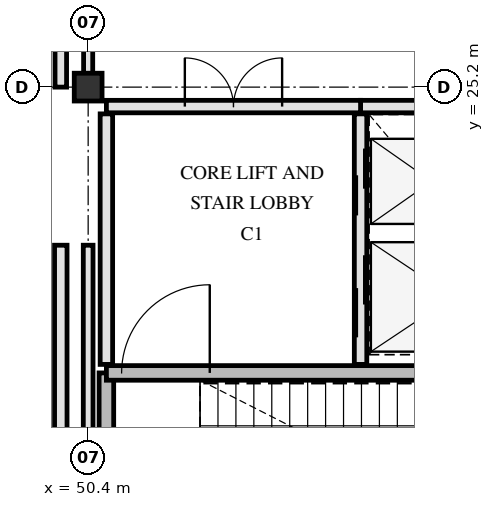
"""IFC4 building model, lengths in metres.
Left out: names, types, materials, properties, quantities, classifications, styles, units other than length and angle.
Written with IfcOpenShell. Run it as: python <this file> out.ifc"""

import sys

from ifc_helpers import new_model, si_unit, direction, frame, frame_2d, origin, origin_2d, place, context, subcontext, project, spatial, rectangle, hollow_circle, extrude, element, fill, save


model = new_model("IFC4")
c1 = context("Model", 3, precision=1e-05, world=origin(), true_north=direction((0.0, 1.0)))
c2 = subcontext(c1, "Body", "Model", "MODEL_VIEW")
j1 = project(units=[si_unit("LENGTHUNIT", "METRE"), si_unit("PLANEANGLEUNIT", "RADIAN")], contexts=[c1])
p1 = place(None, origin())
s1 = spatial("IfcSite", under=j1, at=p1, CompositionType="ELEMENT")
p2 = place(p1, origin())
s2 = spatial("IfcBuilding", under=s1, at=p2, CompositionType="ELEMENT")
p3 = place(p2, frame((0.0, 0.0, 4.8)))
s3 = spatial("IfcBuildingStorey", under=s2, at=p3, CompositionType="ELEMENT", Elevation=4.8)
p4 = place(p3, frame((50.4, 25.2, 0.0), z_axis=(0.0, 0.0, 1.0), x_axis=(1.0, 0.0, 0.0)))
e1 = element("IfcColumn", 1, at=p4, inside=s3, PredefinedType="COLUMN", context=c2, shape_type="SweptSolid", body=[
    extrude(hollow_circle(Radius=0.229, WallThickness=0.02, at=origin_2d()), origin(), (0.0, 0.0, 1.0), 4.5),
])
p5 = place(p3, frame((50.7, 17.18, 0.0), z_axis=(0.0, 0.0, 1.0), x_axis=(0.0, 1.0, 0.0)))
e2 = element("IfcWall", 2, at=p5, inside=s3, PredefinedType="SHEAR", context=c2, shape_type="SweptSolid", body=[
    extrude(rectangle(XDim=3.32, YDim=0.24, at=frame_2d((1.66, 0.0))), origin(), (0.0, 0.0, 1.0), 4.15),
])
p6 = place(p3, frame((50.7, 20.5, 0.0), z_axis=(0.0, 0.0, 1.0), x_axis=(1.0, 0.0, 0.0)))
e3 = element("IfcWall", 3, at=p6, inside=s3, PredefinedType="SHEAR", context=c2, shape_type="SweptSolid", body=[
    extrude(rectangle(XDim=7.82, YDim=0.24, at=frame_2d((3.91, 0.0))), origin(), (0.0, 0.0, 1.0), 4.15),
])
p7 = place(p6, frame((0.25, 0.0, 0.0)))
e4 = element("IfcOpeningElement", 4, at=p7, cuts=e3, PredefinedType="OPENING", context=c2, shape_type="SweptSolid", body=[
    extrude(rectangle(XDim=1.45, YDim=2.2, at=frame_2d((0.725, 1.1))), frame((0.0, 0.13, 0.0), z_axis=(0.0, -1.0, 0.0), x_axis=(1.0, 0.0, 0.0)), (0.0, 0.0, 1.0), 0.26),
])
p8 = place(p3, frame((54.88, 20.64, 0.0), z_axis=(0.0, 0.0, 1.0), x_axis=(0.0, 1.0, 0.0)))
e5 = element("IfcWall", 5, at=p8, inside=s3, PredefinedType="PARTITIONING", context=c2, shape_type="SweptSolid", body=[
    extrude(rectangle(XDim=4.12, YDim=0.205, at=frame_2d((2.06, 0.0))), origin(), (0.0, 0.0, 1.0), 4.14),
])
p9 = place(p8, frame((0.445, 0.0, 0.0)))
e6 = element("IfcOpeningElement", 6, at=p9, cuts=e5, PredefinedType="OPENING", context=c2, shape_type="SweptSolid", body=[
    extrude(rectangle(XDim=1.35, YDim=2.2, at=frame_2d((0.675, 1.1))), frame((0.0, 0.113, 0.0), z_axis=(0.0, -1.0, 0.0), x_axis=(1.0, 0.0, 0.0)), (0.0, 0.0, 1.0), 0.225),
])
p10 = place(p8, frame((2.45, 0.0, 0.0)))
e7 = element("IfcOpeningElement", 7, at=p10, cuts=e5, PredefinedType="OPENING", context=c2, shape_type="SweptSolid", body=[
    extrude(rectangle(XDim=1.1, YDim=2.15, at=frame_2d((0.55, 1.075))), frame((0.0, 0.113, 0.0), z_axis=(0.0, -1.0, 0.0), x_axis=(1.0, 0.0, 0.0)), (0.0, 0.0, 1.0), 0.225),
])
p11 = place(p3, frame((54.88, 24.88, 0.0), z_axis=(0.0, 0.0, 1.0), x_axis=(1.0, 0.0, 0.0)))
e8 = element("IfcWall", 8, at=p11, inside=s3, PredefinedType="PARTITIONING", context=c2, shape_type="SweptSolid", body=[
    extrude(rectangle(XDim=3.57, YDim=0.205, at=frame_2d((1.785, 0.0))), origin(), (0.0, 0.0, 1.0), 3.54),
])
p12 = place(p3, frame((50.7, 20.64, 0.0), z_axis=(0.0, 0.0, 1.0), x_axis=(0.0, 1.0, 0.0)))
e9 = element("IfcWall", 9, at=p12, inside=s3, PredefinedType="PARTITIONING", context=c2, shape_type="SweptSolid", body=[
    extrude(rectangle(XDim=4.12, YDim=0.205, at=frame_2d((2.06, 0.0))), origin(), (0.0, 0.0, 1.0), 4.14),
])
p13 = place(p3, frame((50.7, 24.88, 0.0), z_axis=(0.0, 0.0, 1.0), x_axis=(1.0, 0.0, 0.0)))
e10 = element("IfcWall", 10, at=p13, inside=s3, PredefinedType="PARTITIONING", context=c2, shape_type="SweptSolid", body=[
    extrude(rectangle(XDim=4.18, YDim=0.205, at=frame_2d((2.09, 0.0))), origin(), (0.0, 0.0, 1.0), 3.54),
])
p14 = place(p13, frame((1.29, 0.0, 0.0)))
e11 = element("IfcOpeningElement", 11, at=p14, cuts=e10, PredefinedType="OPENING", context=c2, shape_type="SweptSolid", body=[
    extrude(rectangle(XDim=1.6, YDim=2.25, at=frame_2d((0.8, 1.125))), frame((0.0, 0.113, 0.0), z_axis=(0.0, -1.0, 0.0), x_axis=(1.0, 0.0, 0.0)), (0.0, 0.0, 1.0), 0.225),
])
p15 = place(p3, frame((49.95, 17.465, 0.0), z_axis=(0.0, 0.0, 1.0), x_axis=(0.0, 1.0, 0.0)))
e12 = element("IfcWall", 12, at=p15, inside=s3, PredefinedType="PARTITIONING", context=c2, shape_type="SweptSolid", body=[
    extrude(rectangle(XDim=5.135, YDim=0.205, at=frame_2d((2.567, 0.0))), origin(), (0.0, 0.0, 1.0), 4.14),
])
p16 = place(p3, frame((49.95, 25.2, 0.0), z_axis=(0.0, 0.0, 1.0), x_axis=(0.0, 1.0, 0.0)))
e13 = element("IfcWall", 13, at=p16, inside=s3, PredefinedType="PARTITIONING", context=c2, shape_type="SweptSolid", body=[
    extrude(rectangle(XDim=2.335, YDim=0.19, at=frame_2d((1.167, 0.0))), origin(), (0.0, 0.0, 1.0), 3.54),
])
p17 = place(p3, frame((50.4, 17.023, 0.0), z_axis=(0.0, 0.0, 1.0), x_axis=(0.0, 1.0, 0.0)))
e14 = element("IfcWall", 14, at=p17, inside=s3, PredefinedType="PARTITIONING", context=c2, shape_type="SweptSolid", body=[
    extrude(rectangle(XDim=5.577, YDim=0.16, at=frame_2d((2.788, 0.0))), origin(), (0.0, 0.0, 1.0), 3.74),
])
p18 = place(p3, frame((50.4, 25.424, 0.0), z_axis=(0.0, 0.0, 1.0), x_axis=(0.0, 1.0, 0.0)))
e15 = element("IfcWall", 15, at=p18, inside=s3, PredefinedType="PARTITIONING", context=c2, shape_type="SweptSolid", body=[
    extrude(rectangle(XDim=7.953, YDim=0.15, at=frame_2d((3.977, 0.0))), origin(), (0.0, 0.0, 1.0), 3.74),
])
p19 = place(p7, origin())
e16 = element("IfcDoor", 16, at=p19, inside=s3, OperationType="SINGLE_SWING_RIGHT", PredefinedType="DOOR", context=c2, shape_type="SweptSolid", body=[
    extrude(rectangle(XDim=1.45, YDim=2.2, at=frame_2d((0.725, 1.1))), frame((0.0, 0.025, 0.0), z_axis=(0.0, -1.0, 0.0), x_axis=(1.0, 0.0, 0.0)), (0.0, 0.0, 1.0), 0.05),
])
fill(e4, e16)
p20 = place(p9, origin())
e17 = element("IfcDoor", 17, at=p20, inside=s3, OperationType="SLIDING_TO_LEFT", PredefinedType="DOOR", context=c2, shape_type="SweptSolid", body=[
    extrude(rectangle(XDim=1.35, YDim=2.2, at=frame_2d((0.675, 1.1))), frame((0.0, 0.025, 0.0), z_axis=(0.0, -1.0, 0.0), x_axis=(1.0, 0.0, 0.0)), (0.0, 0.0, 1.0), 0.05),
])
fill(e6, e17)
p21 = place(p10, origin())
e18 = element("IfcDoor", 18, at=p21, inside=s3, OperationType="SLIDING_TO_LEFT", PredefinedType="DOOR", context=c2, shape_type="SweptSolid", body=[
    extrude(rectangle(XDim=1.1, YDim=2.15, at=frame_2d((0.55, 1.075))), frame((0.0, 0.025, 0.0), z_axis=(0.0, -1.0, 0.0), x_axis=(1.0, 0.0, 0.0)), (0.0, 0.0, 1.0), 0.05),
])
fill(e7, e18)
p22 = place(p14, origin())
e19 = element("IfcDoor", 19, at=p22, inside=s3, OperationType="DOUBLE_SWING_LEFT", PredefinedType="DOOR", context=c2, shape_type="SweptSolid", body=[
    extrude(rectangle(XDim=1.6, YDim=2.25, at=frame_2d((0.8, 1.125))), frame((0.0, 0.025, 0.0), z_axis=(0.0, -1.0, 0.0), x_axis=(1.0, 0.0, 0.0)), (0.0, 0.0, 1.0), 0.05),
])
fill(e11, e19)
save(model, sys.argv[1])
